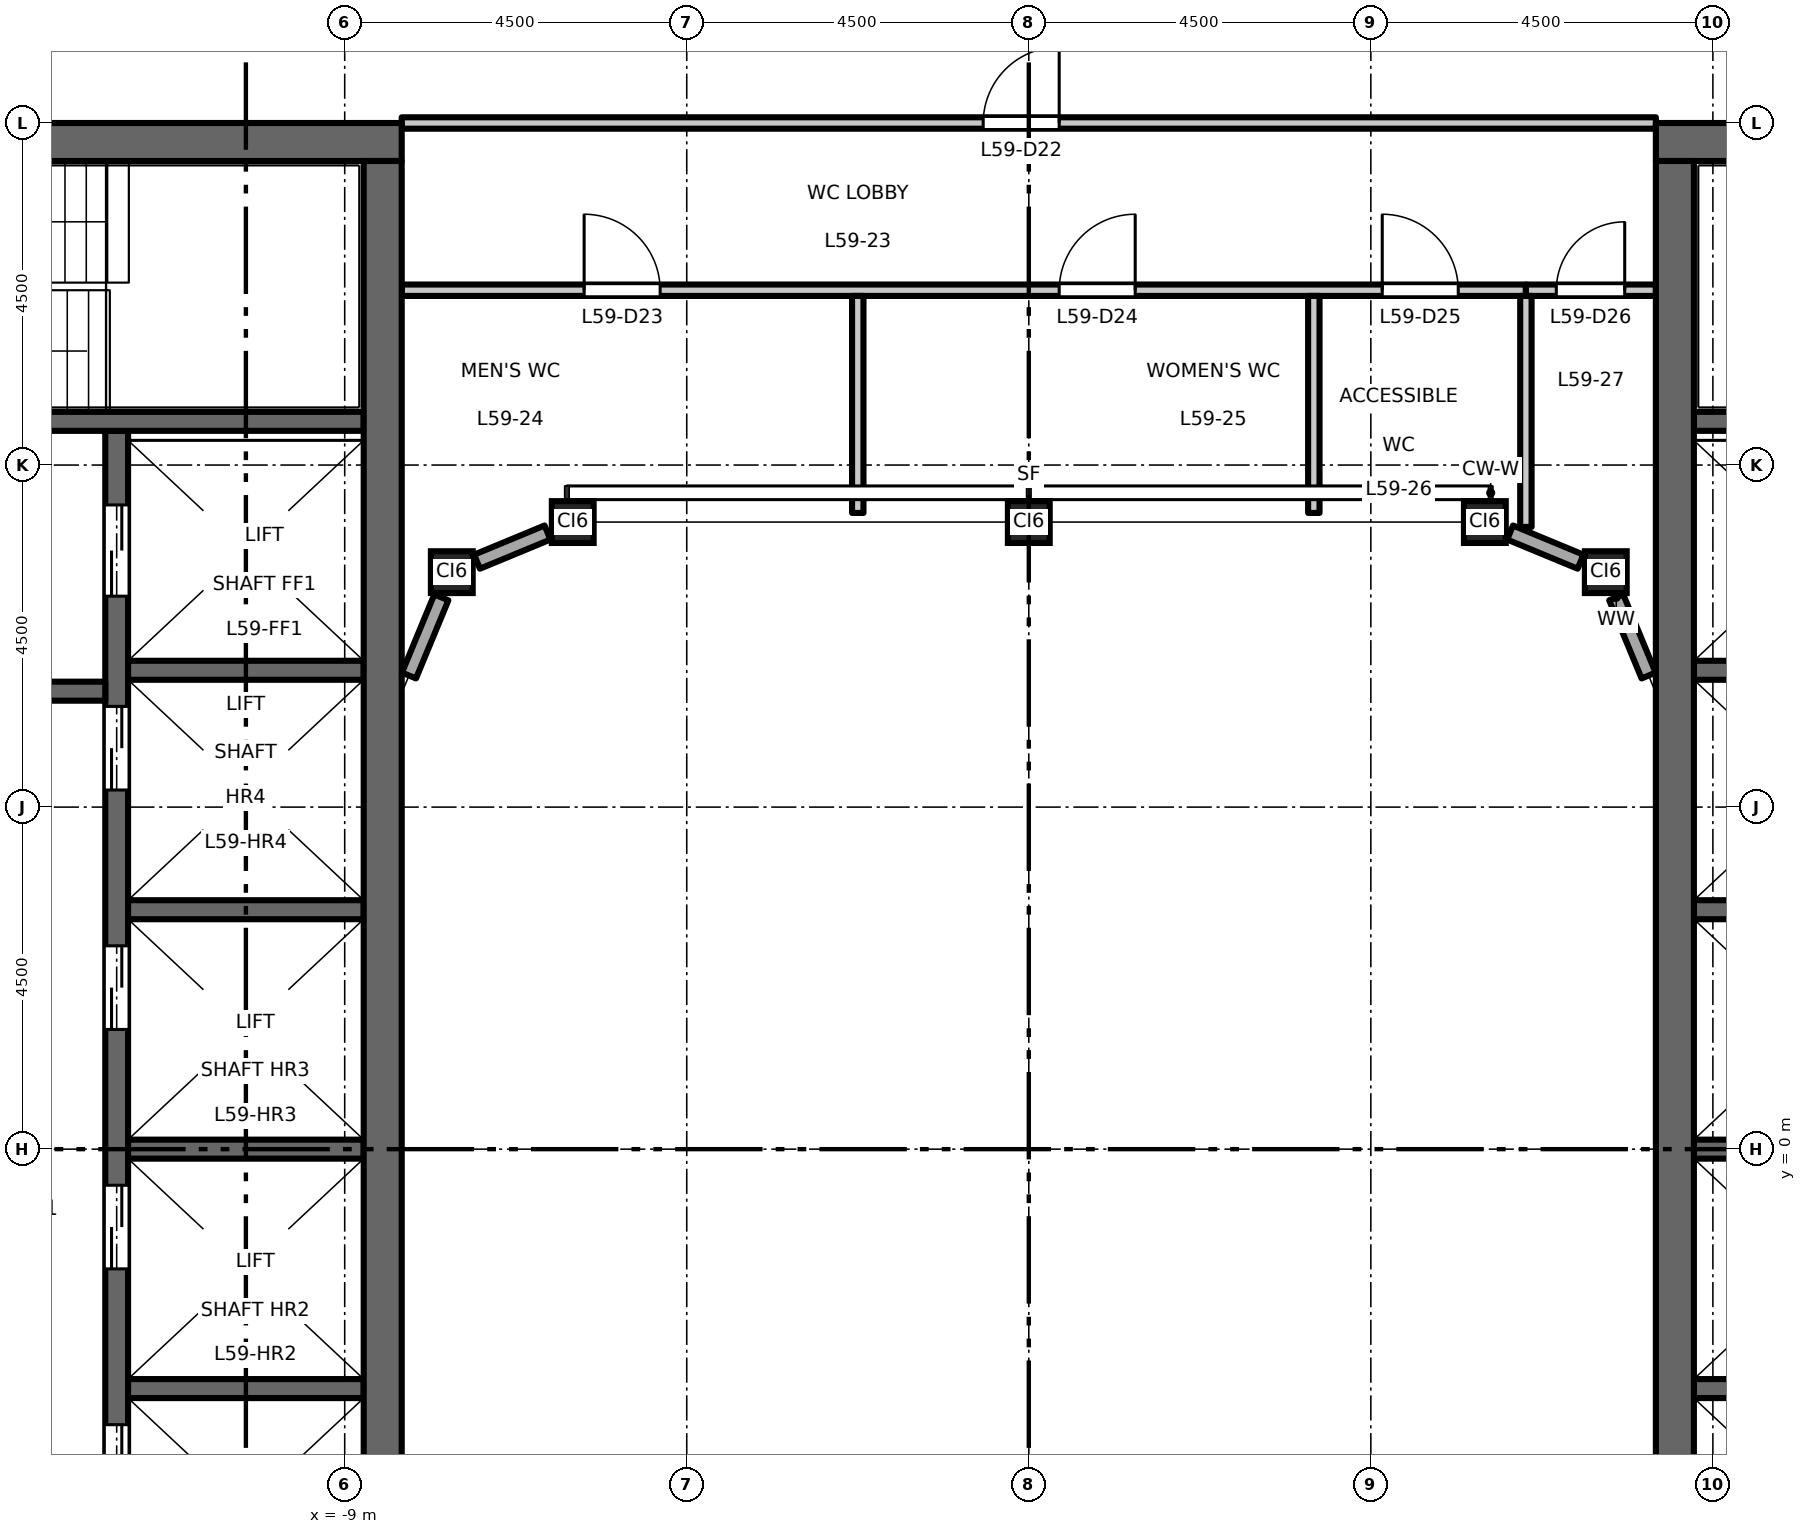
"""IFC4 building model, lengths in metres.
Left out: names, types, materials, properties, quantities, classifications, styles, units other than length and angle.
Written with IfcOpenShell. Run it as: python <this file> out.ifc"""

import sys

from ifc_helpers import new_model, si_unit, direction, frame, frame_2d, origin, origin_2d, place, context, subcontext, project, spatial, rectangle, hollow_rectangle, extrude, element, fill, save


model = new_model("IFC4")
c1 = context("Model", 3, precision=1e-05, world=origin(), true_north=direction((0.0, 1.0)))
c2 = subcontext(c1, "Body", "Model", "MODEL_VIEW")
j1 = project(units=[si_unit("LENGTHUNIT", "METRE"), si_unit("PLANEANGLEUNIT", "RADIAN")], contexts=[c1])
p1 = place(None, origin())
s1 = spatial("IfcSite", under=j1, at=p1, CompositionType="ELEMENT")
p2 = place(p1, origin())
s2 = spatial("IfcBuilding", under=s1, at=p2, CompositionType="ELEMENT")
p3 = place(p2, frame((0.0, 0.0, 273.7)))
s3 = spatial("IfcBuildingStorey", under=s2, at=p3, CompositionType="ELEMENT", Elevation=273.7)
for number, where, z_axis, x_axis in (
    (1, (-7.591, 7.591, 0.0), (0.0, 0.0, 1.0), (1.0, 0.0, 0.0)),
    (2, (-6.0, 8.25, 0.0), (0.0, 0.0, 1.0), (1.0, 0.0, 0.0)),
    (3, (0.0, 8.25, 0.0), (0.0, 0.0, 1.0), (1.0, 0.0, 0.0)),
    (4, (6.0, 8.25, 0.0), (0.0, 0.0, 1.0), (1.0, 0.0, 0.0)),
    (5, (7.591, 7.591, 0.0), (0.0, 0.0, 1.0), (1.0, 0.0, 0.0)),
):
    element("IfcColumn", number, at=place(p3, frame(where, z_axis=z_axis, x_axis=x_axis)), inside=s3, PredefinedType="COLUMN", context=c2, shape_type="SweptSolid", body=[
        extrude(hollow_rectangle(XDim=0.55, YDim=0.55, WallThickness=0.028, at=origin_2d()), origin(), (0.0, 0.0, 1.0), 4.5),
    ])
p4 = place(p3, frame((-12.0, -9.45, 0.0), z_axis=(0.0, 0.0, 1.0), x_axis=(0.0, 1.0, 0.0)))
e6 = element("IfcWall", 6, at=p4, inside=s3, PredefinedType="SHEAR", context=c2, shape_type="SweptSolid", body=[
    extrude(rectangle(XDim=18.9, YDim=0.3, at=frame_2d((9.45, 0.0))), origin(), (0.0, 0.0, 1.0), 4.3),
])
p5 = place(p4, frame((4.725, 0.0, 0.0)))
e7 = element("IfcOpeningElement", 7, at=p5, cuts=e6, PredefinedType="OPENING", context=c2, shape_type="SweptSolid", body=[
    extrude(rectangle(XDim=1.1, YDim=2.1, at=frame_2d((0.55, 1.05))), frame((0.0, 0.16, 0.0), z_axis=(0.0, -1.0, 0.0), x_axis=(1.0, 0.0, 0.0)), (0.0, 0.0, 1.0), 0.32),
])
p6 = place(p4, frame((7.875, 0.0, 0.0)))
e8 = element("IfcOpeningElement", 8, at=p6, cuts=e6, PredefinedType="OPENING", context=c2, shape_type="SweptSolid", body=[
    extrude(rectangle(XDim=1.1, YDim=2.1, at=frame_2d((0.55, 1.05))), frame((0.0, 0.16, 0.0), z_axis=(0.0, -1.0, 0.0), x_axis=(1.0, 0.0, 0.0)), (0.0, 0.0, 1.0), 0.32),
])
p7 = place(p4, frame((11.025, 0.0, 0.0)))
e9 = element("IfcOpeningElement", 9, at=p7, cuts=e6, PredefinedType="OPENING", context=c2, shape_type="SweptSolid", body=[
    extrude(rectangle(XDim=1.1, YDim=2.1, at=frame_2d((0.55, 1.05))), frame((0.0, 0.16, 0.0), z_axis=(0.0, -1.0, 0.0), x_axis=(1.0, 0.0, 0.0)), (0.0, 0.0, 1.0), 0.32),
])
p8 = place(p4, frame((14.175, 0.0, 0.0)))
e10 = element("IfcOpeningElement", 10, at=p8, cuts=e6, PredefinedType="OPENING", context=c2, shape_type="SweptSolid", body=[
    extrude(rectangle(XDim=1.1, YDim=2.1, at=frame_2d((0.55, 1.05))), frame((0.0, 0.16, 0.0), z_axis=(0.0, -1.0, 0.0), x_axis=(1.0, 0.0, 0.0)), (0.0, 0.0, 1.0), 0.32),
])
p9 = place(p4, frame((16.725, 0.0, 0.0)))
e11 = element("IfcOpeningElement", 11, at=p9, cuts=e6, PredefinedType="OPENING", context=c2, shape_type="SweptSolid", body=[
    extrude(rectangle(XDim=1.2, YDim=2.1, at=frame_2d((0.6, 1.05))), frame((0.0, 0.16, 0.0), z_axis=(0.0, -1.0, 0.0), x_axis=(1.0, 0.0, 0.0)), (0.0, 0.0, 1.0), 0.32),
])
p10 = place(p4, frame((0.975, 0.0, 0.0)))
e12 = element("IfcOpeningElement", 12, at=p10, cuts=e6, PredefinedType="OPENING", context=c2, shape_type="SweptSolid", body=[
    extrude(rectangle(XDim=1.2, YDim=2.1, at=frame_2d((0.6, 1.05))), frame((0.0, 0.16, 0.0), z_axis=(0.0, -1.0, 0.0), x_axis=(1.0, 0.0, 0.0)), (0.0, 0.0, 1.0), 0.32),
])
p11 = place(p3, frame((-12.15, 6.025, 0.0), z_axis=(0.0, 0.0, 1.0), x_axis=(-1.0, 0.0, 0.0)))
e13 = element("IfcWall", 13, at=p11, inside=s3, PredefinedType="SHEAR", context=c2, shape_type="SweptSolid", body=[
    extrude(rectangle(XDim=4.6, YDim=0.25, at=frame_2d((2.3, 0.0))), origin(), (0.0, 0.0, 1.0), 4.3),
])
p12 = place(p11, frame((1.8, 0.0, 0.0)))
e14 = element("IfcOpeningElement", 14, at=p12, cuts=e13, PredefinedType="OPENING", context=c2, shape_type="SweptSolid", body=[
    extrude(rectangle(XDim=1.0, YDim=2.1, at=frame_2d((0.5, 1.05))), frame((0.0, 0.135, 0.0), z_axis=(0.0, -1.0, 0.0), x_axis=(1.0, 0.0, 0.0)), (0.0, 0.0, 1.0), 0.27),
])
for number, where, z_axis, x_axis in (
    (15, (-8.75, 0.0, 0.0), (0.0, 0.0, 1.0), (-1.0, 0.0, 0.0)),
    (16, (-8.75, 3.15, 0.0), (0.0, 0.0, 1.0), (-1.0, 0.0, 0.0)),
    (17, (-8.75, 6.3, 0.0), (0.0, 0.0, 1.0), (-1.0, 0.0, 0.0)),
    (18, (-8.75, -3.15, 0.0), (0.0, 0.0, 1.0), (-1.0, 0.0, 0.0)),
):
    element("IfcWall", number, at=place(p3, frame(where, z_axis=z_axis, x_axis=x_axis)), inside=s3, PredefinedType="SHEAR", context=c2, shape_type="SweptSolid", body=[
        extrude(rectangle(XDim=3.1, YDim=0.25, at=frame_2d((1.55, 0.0))), origin(), (0.0, 0.0, 1.0), 4.3),
    ])
p13 = place(p3, frame((-8.75, 9.575, 0.0), z_axis=(0.0, 0.0, 1.0), x_axis=(-1.0, 0.0, 0.0)))
e19 = element("IfcWall", 19, at=p13, inside=s3, PredefinedType="SHEAR", context=c2, shape_type="SweptSolid", body=[
    extrude(rectangle(XDim=8.0, YDim=0.25, at=frame_2d((4.0, 0.0))), origin(), (0.0, 0.0, 1.0), 4.3),
])
p14 = place(p13, frame((6.65, 0.0, 0.0)))
e20 = element("IfcOpeningElement", 20, at=p14, cuts=e19, PredefinedType="OPENING", context=c2, shape_type="SweptSolid", body=[
    extrude(rectangle(XDim=1.1, YDim=2.1, at=frame_2d((0.55, 1.05))), frame((0.0, 0.135, 0.0), z_axis=(0.0, -1.0, 0.0), x_axis=(1.0, 0.0, 0.0)), (0.0, 0.0, 1.0), 0.27),
])
p15 = place(p3, frame((-8.25, 13.25, 0.0), z_axis=(0.0, 0.0, 1.0), x_axis=(-1.0, 0.0, 0.0)))
e21 = element("IfcWall", 21, at=p15, inside=s3, PredefinedType="SHEAR", context=c2, shape_type="SweptSolid", body=[
    extrude(rectangle(XDim=13.5, YDim=0.5, at=frame_2d((6.75, 0.0))), origin(), (0.0, 0.0, 1.0), 4.3),
])
p16 = place(p3, frame((-8.5, -13.0, 0.0), z_axis=(0.0, 0.0, 1.0), x_axis=(0.0, 1.0, 0.0)))
e22 = element("IfcWall", 22, at=p16, inside=s3, PredefinedType="SHEAR", context=c2, shape_type="SweptSolid", body=[
    extrude(rectangle(XDim=26.0, YDim=0.5, at=frame_2d((13.0, 0.0))), origin(), (0.0, 0.0, 1.0), 4.3),
])
for number, where, z_axis, x_axis in (
    (23, (8.75, 0.0, 0.0), (0.0, 0.0, 1.0), (1.0, 0.0, 0.0)),
    (24, (8.75, 3.15, 0.0), (0.0, 0.0, 1.0), (1.0, 0.0, 0.0)),
    (25, (8.75, 6.3, 0.0), (0.0, 0.0, 1.0), (1.0, 0.0, 0.0)),
    (26, (8.75, -3.15, 0.0), (0.0, 0.0, 1.0), (1.0, 0.0, 0.0)),
):
    element("IfcWall", number, at=place(p3, frame(where, z_axis=z_axis, x_axis=x_axis)), inside=s3, PredefinedType="SHEAR", context=c2, shape_type="SweptSolid", body=[
        extrude(rectangle(XDim=3.1, YDim=0.25, at=frame_2d((1.55, 0.0))), origin(), (0.0, 0.0, 1.0), 4.3),
    ])
p17 = place(p3, frame((8.75, 9.575, 0.0), z_axis=(0.0, 0.0, 1.0), x_axis=(1.0, 0.0, 0.0)))
e27 = element("IfcWall", 27, at=p17, inside=s3, PredefinedType="SHEAR", context=c2, shape_type="SweptSolid", body=[
    extrude(rectangle(XDim=8.0, YDim=0.25, at=frame_2d((4.0, 0.0))), origin(), (0.0, 0.0, 1.0), 4.3),
])
p18 = place(p17, frame((6.65, 0.0, 0.0)))
e28 = element("IfcOpeningElement", 28, at=p18, cuts=e27, PredefinedType="OPENING", context=c2, shape_type="SweptSolid", body=[
    extrude(rectangle(XDim=1.1, YDim=2.1, at=frame_2d((0.55, 1.05))), frame((0.0, 0.135, 0.0), z_axis=(0.0, -1.0, 0.0), x_axis=(1.0, 0.0, 0.0)), (0.0, 0.0, 1.0), 0.27),
])
p19 = place(p3, frame((8.25, 13.25, 0.0), z_axis=(0.0, 0.0, 1.0), x_axis=(1.0, 0.0, 0.0)))
e29 = element("IfcWall", 29, at=p19, inside=s3, PredefinedType="SHEAR", context=c2, shape_type="SweptSolid", body=[
    extrude(rectangle(XDim=13.5, YDim=0.5, at=frame_2d((6.75, 0.0))), origin(), (0.0, 0.0, 1.0), 4.3),
])
p20 = place(p3, frame((8.5, -13.0, 0.0), z_axis=(0.0, 0.0, 1.0), x_axis=(0.0, 1.0, 0.0)))
e30 = element("IfcWall", 30, at=p20, inside=s3, PredefinedType="SHEAR", context=c2, shape_type="SweptSolid", body=[
    extrude(rectangle(XDim=26.0, YDim=0.5, at=frame_2d((13.0, 0.0))), origin(), (0.0, 0.0, 1.0), 4.3),
])
p21 = place(p3, frame((8.154, 6.231, 0.0), z_axis=(0.0, 0.0, 1.0), x_axis=(-0.382635994082, 0.923899180665, 0.0)))
e31 = element("IfcWall", 31, at=p21, inside=s3, PredefinedType="STANDARD", context=c2, shape_type="SweptSolid", body=[
    extrude(rectangle(XDim=1.113, YDim=0.2, at=frame_2d((0.556, 0.0))), origin(), (0.0, 0.0, 1.0), 3.868),
])
for number, where, z_axis, x_axis in (
    (32, (7.259, 7.729, 0.0), (0.0, 0.0, 1.0), (-0.924, 0.383, 0.0)),
    (33, (-6.332, 8.113, 0.0), (0.0, 0.0, 1.0), (-0.924, -0.383, 0.0)),
):
    element("IfcWall", number, at=place(p3, frame(where, z_axis=z_axis, x_axis=x_axis)), inside=s3, PredefinedType="STANDARD", context=c2, shape_type="SweptSolid", body=[
        extrude(rectangle(XDim=1.003, YDim=0.2, at=frame_2d((0.502, 0.0))), origin(), (0.0, 0.0, 1.0), 3.868),
    ])
p22 = place(p3, frame((-7.729, 7.259, 0.0), z_axis=(0.0, 0.0, 1.0), x_axis=(-0.382635994082, -0.923899180665, 0.0)))
e34 = element("IfcWall", 34, at=p22, inside=s3, PredefinedType="STANDARD", context=c2, shape_type="SweptSolid", body=[
    extrude(rectangle(XDim=1.113, YDim=0.2, at=frame_2d((0.556, 0.0))), origin(), (0.0, 0.0, 1.0), 3.868),
])
p23 = place(p3, frame((-8.25, 11.3, 0.0), z_axis=(0.0, 0.0, 1.0), x_axis=(1.0, 0.0, 0.0)))
e35 = element("IfcWall", 35, at=p23, inside=s3, PredefinedType="PARTITIONING", context=c2, shape_type="SweptSolid", body=[
    extrude(rectangle(XDim=14.79, YDim=0.15, at=frame_2d((7.395, 0.0))), origin(), (0.0, 0.0, 1.0), 4.3),
])
p24 = place(p23, frame((2.4, 0.0, 0.0)))
e36 = element("IfcOpeningElement", 36, at=p24, cuts=e35, PredefinedType="OPENING", context=c2, shape_type="SweptSolid", body=[
    extrude(rectangle(XDim=1.0, YDim=2.1, at=frame_2d((0.5, 1.05))), frame((0.0, 0.085, 0.0), z_axis=(0.0, -1.0, 0.0), x_axis=(1.0, 0.0, 0.0)), (0.0, 0.0, 1.0), 0.17),
])
p25 = place(p23, frame((8.65, 0.0, 0.0)))
e37 = element("IfcOpeningElement", 37, at=p25, cuts=e35, PredefinedType="OPENING", context=c2, shape_type="SweptSolid", body=[
    extrude(rectangle(XDim=1.0, YDim=2.1, at=frame_2d((0.5, 1.05))), frame((0.0, 0.085, 0.0), z_axis=(0.0, -1.0, 0.0), x_axis=(1.0, 0.0, 0.0)), (0.0, 0.0, 1.0), 0.17),
])
p26 = place(p23, frame((12.9, 0.0, 0.0)))
e38 = element("IfcOpeningElement", 38, at=p26, cuts=e35, PredefinedType="OPENING", context=c2, shape_type="SweptSolid", body=[
    extrude(rectangle(XDim=1.0, YDim=2.1, at=frame_2d((0.5, 1.05))), frame((0.0, 0.085, 0.0), z_axis=(0.0, -1.0, 0.0), x_axis=(1.0, 0.0, 0.0)), (0.0, 0.0, 1.0), 0.17),
])
p27 = place(p3, frame((6.54, 11.3, 0.0), z_axis=(0.0, 0.0, 1.0), x_axis=(1.0, 0.0, 0.0)))
e39 = element("IfcWall", 39, at=p27, inside=s3, PredefinedType="PARTITIONING", context=c2, shape_type="SweptSolid", body=[
    extrude(rectangle(XDim=1.71, YDim=0.15, at=frame_2d((0.855, 0.0))), origin(), (0.0, 0.0, 1.0), 4.3),
])
p28 = place(p27, frame((0.4, 0.0, 0.0)))
e40 = element("IfcOpeningElement", 40, at=p28, cuts=e39, PredefinedType="OPENING", context=c2, shape_type="SweptSolid", body=[
    extrude(rectangle(XDim=0.9, YDim=2.1, at=frame_2d((0.45, 1.05))), frame((0.0, 0.085, 0.0), z_axis=(0.0, -1.0, 0.0), x_axis=(1.0, 0.0, 0.0)), (0.0, 0.0, 1.0), 0.17),
])
p29 = place(p3, frame((-8.25, 13.5, 0.0), z_axis=(0.0, 0.0, 1.0), x_axis=(1.0, 0.0, 0.0)))
e41 = element("IfcWall", 41, at=p29, inside=s3, PredefinedType="PARTITIONING", context=c2, shape_type="SweptSolid", body=[
    extrude(rectangle(XDim=16.5, YDim=0.15, at=frame_2d((8.25, 0.0))), origin(), (0.0, 0.0, 1.0), 4.3),
])
p30 = place(p29, frame((7.65, 0.0, 0.0)))
e42 = element("IfcOpeningElement", 42, at=p30, cuts=e41, PredefinedType="OPENING", context=c2, shape_type="SweptSolid", body=[
    extrude(rectangle(XDim=1.0, YDim=2.1, at=frame_2d((0.5, 1.05))), frame((0.0, 0.085, 0.0), z_axis=(0.0, -1.0, 0.0), x_axis=(1.0, 0.0, 0.0)), (0.0, 0.0, 1.0), 0.17),
])
for number, where, z_axis, x_axis in (
    (43, (-2.25, 8.37, 0.0), (0.0, 0.0, 1.0), (0.0, 1.0, 0.0)),
    (44, (3.75, 8.37, 0.0), (0.0, 0.0, 1.0), (0.0, 1.0, 0.0)),
):
    element("IfcWall", number, at=place(p3, frame(where, z_axis=z_axis, x_axis=x_axis)), inside=s3, PredefinedType="PARTITIONING", context=c2, shape_type="SweptSolid", body=[
        extrude(rectangle(XDim=2.855, YDim=0.15, at=frame_2d((1.427, 0.0))), origin(), (0.0, 0.0, 1.0), 4.3),
    ])
p31 = place(p3, frame((6.54, 8.186, 0.0), z_axis=(0.0, 0.0, 1.0), x_axis=(0.0, 1.0, 0.0)))
e45 = element("IfcWall", 45, at=p31, inside=s3, PredefinedType="PARTITIONING", context=c2, shape_type="SweptSolid", body=[
    extrude(rectangle(XDim=3.039, YDim=0.15, at=frame_2d((1.52, 0.0))), origin(), (0.0, 0.0, 1.0), 4.3),
])
p32 = place(p5, origin())
e46 = element("IfcDoor", 46, at=p32, inside=s3, OperationType="DOUBLE_DOOR_SLIDING", PredefinedType="DOOR", context=c2, shape_type="SweptSolid", body=[
    extrude(rectangle(XDim=1.1, YDim=2.1, at=frame_2d((0.55, 1.05))), frame((0.0, 0.025, 0.0), z_axis=(0.0, -1.0, 0.0), x_axis=(1.0, 0.0, 0.0)), (0.0, 0.0, 1.0), 0.05),
])
fill(e7, e46)
p33 = place(p6, origin())
e47 = element("IfcDoor", 47, at=p33, inside=s3, OperationType="DOUBLE_DOOR_SLIDING", PredefinedType="DOOR", context=c2, shape_type="SweptSolid", body=[
    extrude(rectangle(XDim=1.1, YDim=2.1, at=frame_2d((0.55, 1.05))), frame((0.0, 0.025, 0.0), z_axis=(0.0, -1.0, 0.0), x_axis=(1.0, 0.0, 0.0)), (0.0, 0.0, 1.0), 0.05),
])
fill(e8, e47)
p34 = place(p7, origin())
e48 = element("IfcDoor", 48, at=p34, inside=s3, OperationType="DOUBLE_DOOR_SLIDING", PredefinedType="DOOR", context=c2, shape_type="SweptSolid", body=[
    extrude(rectangle(XDim=1.1, YDim=2.1, at=frame_2d((0.55, 1.05))), frame((0.0, 0.025, 0.0), z_axis=(0.0, -1.0, 0.0), x_axis=(1.0, 0.0, 0.0)), (0.0, 0.0, 1.0), 0.05),
])
fill(e9, e48)
p35 = place(p8, origin())
e49 = element("IfcDoor", 49, at=p35, inside=s3, OperationType="DOUBLE_DOOR_SLIDING", PredefinedType="DOOR", context=c2, shape_type="SweptSolid", body=[
    extrude(rectangle(XDim=1.1, YDim=2.1, at=frame_2d((0.55, 1.05))), frame((0.0, 0.025, 0.0), z_axis=(0.0, -1.0, 0.0), x_axis=(1.0, 0.0, 0.0)), (0.0, 0.0, 1.0), 0.05),
])
fill(e10, e49)
p36 = place(p9, origin())
e50 = element("IfcDoor", 50, at=p36, inside=s3, OperationType="DOUBLE_DOOR_SLIDING", PredefinedType="DOOR", context=c2, shape_type="SweptSolid", body=[
    extrude(rectangle(XDim=1.2, YDim=2.1, at=frame_2d((0.6, 1.05))), frame((0.0, 0.025, 0.0), z_axis=(0.0, -1.0, 0.0), x_axis=(1.0, 0.0, 0.0)), (0.0, 0.0, 1.0), 0.05),
])
fill(e11, e50)
p37 = place(p30, origin())
e51 = element("IfcDoor", 51, at=p37, inside=s3, OperationType="SINGLE_SWING_RIGHT", PredefinedType="DOOR", context=c2, shape_type="SweptSolid", body=[
    extrude(rectangle(XDim=1.0, YDim=2.1, at=frame_2d((0.5, 1.05))), frame((0.0, 0.025, 0.0), z_axis=(0.0, -1.0, 0.0), x_axis=(1.0, 0.0, 0.0)), (0.0, 0.0, 1.0), 0.05),
])
fill(e42, e51)
p38 = place(p24, origin())
e52 = element("IfcDoor", 52, at=p38, inside=s3, OperationType="SINGLE_SWING_LEFT", PredefinedType="DOOR", context=c2, shape_type="SweptSolid", body=[
    extrude(rectangle(XDim=1.0, YDim=2.1, at=frame_2d((0.5, 1.05))), frame((0.0, 0.025, 0.0), z_axis=(0.0, -1.0, 0.0), x_axis=(1.0, 0.0, 0.0)), (0.0, 0.0, 1.0), 0.05),
])
fill(e36, e52)
p39 = place(p25, origin())
e53 = element("IfcDoor", 53, at=p39, inside=s3, OperationType="SINGLE_SWING_RIGHT", PredefinedType="DOOR", context=c2, shape_type="SweptSolid", body=[
    extrude(rectangle(XDim=1.0, YDim=2.1, at=frame_2d((0.5, 1.05))), frame((0.0, 0.025, 0.0), z_axis=(0.0, -1.0, 0.0), x_axis=(1.0, 0.0, 0.0)), (0.0, 0.0, 1.0), 0.05),
])
fill(e37, e53)
p40 = place(p26, origin())
e54 = element("IfcDoor", 54, at=p40, inside=s3, OperationType="SINGLE_SWING_LEFT", PredefinedType="DOOR", context=c2, shape_type="SweptSolid", body=[
    extrude(rectangle(XDim=1.0, YDim=2.1, at=frame_2d((0.5, 1.05))), frame((0.0, 0.025, 0.0), z_axis=(0.0, -1.0, 0.0), x_axis=(1.0, 0.0, 0.0)), (0.0, 0.0, 1.0), 0.05),
])
fill(e38, e54)
p41 = place(p28, origin())
e55 = element("IfcDoor", 55, at=p41, inside=s3, OperationType="SINGLE_SWING_RIGHT", PredefinedType="DOOR", context=c2, shape_type="SweptSolid", body=[
    extrude(rectangle(XDim=0.9, YDim=2.1, at=frame_2d((0.45, 1.05))), frame((0.0, 0.025, 0.0), z_axis=(0.0, -1.0, 0.0), x_axis=(1.0, 0.0, 0.0)), (0.0, 0.0, 1.0), 0.05),
])
fill(e40, e55)
save(model, sys.argv[1])
